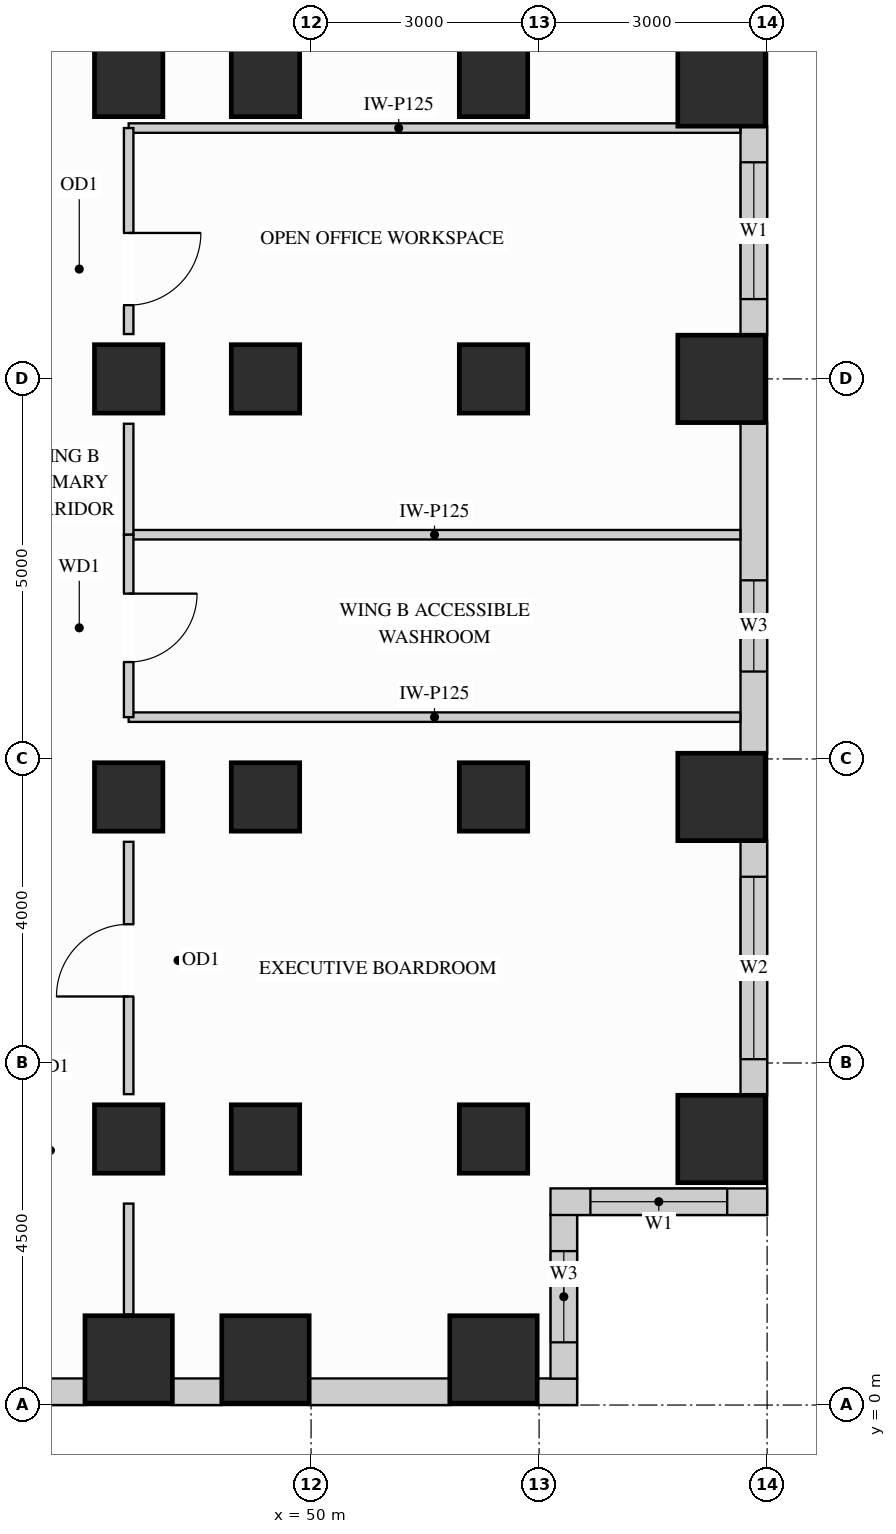
"""IFC4 building model, lengths in metres.
Left out: names, types, materials, properties, quantities, classifications, styles, units other than length and angle.
Written with IfcOpenShell. Run it as: python <this file> out.ifc"""

import sys

from ifc_helpers import new_model, si_unit, direction, frame, frame_2d, origin, origin_2d, place, context, subcontext, project, spatial, rectangle, extrude, source, transform, mapped, element, fill, save


model = new_model("IFC4")
c1 = context("Model", 3, precision=1e-05, world=origin(), true_north=direction((0.0, 1.0)))
c2 = subcontext(c1, "Body", "Model", "MODEL_VIEW")
j1 = project(units=[si_unit("LENGTHUNIT", "METRE"), si_unit("PLANEANGLEUNIT", "RADIAN")], contexts=[c1])
p1 = place(None, origin())
s1 = spatial("IfcSite", under=j1, at=p1, CompositionType="ELEMENT")
p2 = place(p1, origin())
s2 = spatial("IfcBuilding", under=s1, at=p2, CompositionType="ELEMENT")
p3 = place(p2, frame((0.0, 0.0, 131.4)))
s3 = spatial("IfcBuildingStorey", under=s2, at=p3, CompositionType="ELEMENT", Elevation=131.4)
m1 = source(origin(), c2, "Body", "SweptSolid", [
    extrude(rectangle(XDim=0.9, YDim=0.9, at=origin_2d()), origin(), (0.0, 0.0, 1.0), 3.38),
])
for number, where, z_axis, x_axis in (
    (1, (47.6, 13.5, 0.0), (0.0, 0.0, 1.0), (1.0, 0.0, 0.0)),
    (2, (47.6, 3.5, 0.0), (0.0, 0.0, 1.0), (1.0, 0.0, 0.0)),
    (3, (47.6, 8.0, 0.0), (0.0, 0.0, 1.0), (1.0, 0.0, 0.0)),
    (4, (47.6, 17.4, 0.0), (0.0, 0.0, 1.0), (1.0, 0.0, 0.0)),
    (5, (49.4, 13.5, 0.0), (0.0, 0.0, 1.0), (1.0, 0.0, 0.0)),
    (6, (49.4, 17.4, 0.0), (0.0, 0.0, 1.0), (1.0, 0.0, 0.0)),
    (7, (49.4, 3.5, 0.0), (0.0, 0.0, 1.0), (1.0, 0.0, 0.0)),
    (8, (49.4, 8.0, 0.0), (0.0, 0.0, 1.0), (1.0, 0.0, 0.0)),
    (9, (52.4, 13.5, 0.0), (0.0, 0.0, 1.0), (1.0, 0.0, 0.0)),
    (10, (52.4, 17.4, 0.0), (0.0, 0.0, 1.0), (1.0, 0.0, 0.0)),
    (11, (52.4, 3.5, 0.0), (0.0, 0.0, 1.0), (1.0, 0.0, 0.0)),
    (12, (52.4, 8.0, 0.0), (0.0, 0.0, 1.0), (1.0, 0.0, 0.0)),
):
    element("IfcColumn", number, at=place(p3, frame(where, z_axis=z_axis, x_axis=x_axis)), inside=s3, PredefinedType="COLUMN", context=c2, shape_type="MappedRepresentation", body=[
        mapped(m1, transform((0.0, 0.0, 0.0), x_axis=(1.0, 0.0, 0.0), y_axis=(0.0, 1.0, 0.0), z_axis=(0.0, 0.0, 1.0))),
    ])
m2 = source(origin(), c2, "Body", "SweptSolid", [
    extrude(rectangle(XDim=1.15, YDim=1.15, at=origin_2d()), origin(), (0.0, 0.0, 1.0), 3.38),
])
for number, where, z_axis, x_axis in (
    (13, (55.4, 13.5, 0.0), (0.0, 0.0, 1.0), (1.0, 0.0, 0.0)),
    (14, (55.4, 17.4, 0.0), (0.0, 0.0, 1.0), (1.0, 0.0, 0.0)),
    (15, (55.4, 3.5, 0.0), (0.0, 0.0, 1.0), (1.0, 0.0, 0.0)),
    (16, (55.4, 8.0, 0.0), (0.0, 0.0, 1.0), (1.0, 0.0, 0.0)),
    (17, (47.6, 0.6, 0.0), (0.0, 0.0, 1.0), (1.0, 0.0, 0.0)),
    (18, (49.4, 0.6, 0.0), (0.0, 0.0, 1.0), (1.0, 0.0, 0.0)),
    (19, (52.4, 0.6, 0.0), (0.0, 0.0, 1.0), (1.0, 0.0, 0.0)),
):
    element("IfcColumn", number, at=place(p3, frame(where, z_axis=z_axis, x_axis=x_axis)), inside=s3, PredefinedType="COLUMN", context=c2, shape_type="MappedRepresentation", body=[
        mapped(m2, transform((0.0, 0.0, 0.0), x_axis=(1.0, 0.0, 0.0), y_axis=(0.0, 1.0, 0.0), z_axis=(0.0, 0.0, 1.0))),
    ])
p4 = place(p3, frame((40.573, 0.175, 0.0), z_axis=(0.0, 0.0, 1.0), x_axis=(1.0, 0.0, 0.0)))
e20 = element("IfcWall", 20, at=p4, inside=s3, PredefinedType="SOLIDWALL", context=c2, shape_type="SweptSolid", body=[
    extrude(rectangle(XDim=6.454, YDim=0.35, at=frame_2d((3.227, 0.0))), origin(), (0.0, 0.0, 1.0), 2.428),
])
p5 = place(p4, frame((0.712, 0.0, 0.78)))
e21 = element("IfcOpeningElement", 21, at=p5, cuts=e20, PredefinedType="OPENING", context=c2, shape_type="SweptSolid", body=[
    extrude(rectangle(XDim=1.8, YDim=1.468, at=frame_2d((0.9, 0.734))), frame((0.0, 0.185, 0.0), z_axis=(0.0, -1.0, 0.0), x_axis=(1.0, 0.0, 0.0)), (0.0, 0.0, 1.0), 0.37),
])
p6 = place(p4, frame((2.905, 0.0, 0.78)))
e22 = element("IfcOpeningElement", 22, at=p6, cuts=e20, PredefinedType="OPENING", context=c2, shape_type="SweptSolid", body=[
    extrude(rectangle(XDim=1.8, YDim=1.468, at=frame_2d((0.9, 0.734))), frame((0.0, 0.185, 0.0), z_axis=(0.0, -1.0, 0.0), x_axis=(1.0, 0.0, 0.0)), (0.0, 0.0, 1.0), 0.37),
])
m3 = source(origin(), c2, "Body", "SweptSolid", [
    extrude(rectangle(XDim=0.654, YDim=0.35, at=frame_2d((0.327, 0.0))), origin(), (0.0, 0.0, 1.0), 3.365),
])
p7 = place(p3, frame((48.173, 0.175, 0.0), z_axis=(0.0, 0.0, 1.0), x_axis=(1.0, 0.0, 0.0)))
e23 = element("IfcWall", 23, at=p7, inside=s3, PredefinedType="SOLIDWALL", context=c2, shape_type="MappedRepresentation", body=[
    mapped(m3, transform((0.0, 0.0, 0.0), x_axis=(1.0, 0.0, 0.0), y_axis=(0.0, 1.0, 0.0), z_axis=(0.0, 0.0, 1.0))),
])
m4 = source(origin(), c2, "Body", "SweptSolid", [
    extrude(rectangle(XDim=1.854, YDim=0.35, at=frame_2d((0.927, 0.0))), origin(), (0.0, 0.0, 1.0), 3.365),
])
p8 = place(p3, frame((49.973, 0.175, 0.0), z_axis=(0.0, 0.0, 1.0), x_axis=(1.0, 0.0, 0.0)))
e24 = element("IfcWall", 24, at=p8, inside=s3, PredefinedType="SOLIDWALL", context=c2, shape_type="MappedRepresentation", body=[
    mapped(m4, transform((0.0, 0.0, 0.0), x_axis=(1.0, 0.0, 0.0), y_axis=(0.0, 1.0, 0.0), z_axis=(0.0, 0.0, 1.0))),
])
m5 = source(origin(), c2, "Body", "SweptSolid", [
    extrude(rectangle(XDim=0.527, YDim=0.35, at=frame_2d((0.264, 0.0))), origin(), (0.0, 0.0, 1.0), 3.365),
])
p9 = place(p3, frame((52.973, 0.175, 0.0), z_axis=(0.0, 0.0, 1.0), x_axis=(1.0, 0.0, 0.0)))
e25 = element("IfcWall", 25, at=p9, inside=s3, PredefinedType="SOLIDWALL", context=c2, shape_type="MappedRepresentation", body=[
    mapped(m5, transform((0.0, 0.0, 0.0), x_axis=(1.0, 0.0, 0.0), y_axis=(0.0, 1.0, 0.0), z_axis=(0.0, 0.0, 1.0))),
])
p10 = place(p3, frame((53.325, 0.348, 0.0), z_axis=(0.0, 0.0, 1.0), x_axis=(0.0, 1.0, 0.0)))
e26 = element("IfcWall", 26, at=p10, inside=s3, PredefinedType="SOLIDWALL", context=c2, shape_type="SweptSolid", body=[
    extrude(rectangle(XDim=2.154, YDim=0.35, at=frame_2d((1.077, 0.0))), origin(), (0.0, 0.0, 1.0), 3.365),
])
p11 = place(p10, frame((0.477, 0.0, 0.78)))
e27 = element("IfcOpeningElement", 27, at=p11, cuts=e26, PredefinedType="OPENING", context=c2, shape_type="SweptSolid", body=[
    extrude(rectangle(XDim=1.2, YDim=2.1, at=frame_2d((0.6, 1.05))), frame((0.0, 0.185, 0.0), z_axis=(0.0, -1.0, 0.0), x_axis=(1.0, 0.0, 0.0)), (0.0, 0.0, 1.0), 0.37),
])
p12 = place(p3, frame((53.15, 2.675, 0.0), z_axis=(0.0, 0.0, 1.0), x_axis=(1.0, 0.0, 0.0)))
e28 = element("IfcWall", 28, at=p12, inside=s3, PredefinedType="SOLIDWALL", context=c2, shape_type="SweptSolid", body=[
    extrude(rectangle(XDim=2.85, YDim=0.35, at=frame_2d((1.425, 0.0))), origin(), (0.0, 0.0, 1.0), 3.365),
])
p13 = place(p12, frame((0.525, 0.0, 0.78)))
e29 = element("IfcOpeningElement", 29, at=p13, cuts=e28, PredefinedType="OPENING", context=c2, shape_type="SweptSolid", body=[
    extrude(rectangle(XDim=1.8, YDim=2.1, at=frame_2d((0.9, 1.05))), frame((0.0, 0.185, 0.0), z_axis=(0.0, -1.0, 0.0), x_axis=(1.0, 0.0, 0.0)), (0.0, 0.0, 1.0), 0.37),
])
p14 = place(p3, frame((55.825, 4.073, 0.0), z_axis=(0.0, 0.0, 1.0), x_axis=(0.0, 1.0, 0.0)))
e30 = element("IfcWall", 30, at=p14, inside=s3, PredefinedType="SOLIDWALL", context=c2, shape_type="SweptSolid", body=[
    extrude(rectangle(XDim=3.354, YDim=0.35, at=frame_2d((1.677, 0.0))), origin(), (0.0, 0.0, 1.0), 3.365),
])
p15 = place(p14, frame((0.477, 0.0, 0.78)))
e31 = element("IfcOpeningElement", 31, at=p15, cuts=e30, PredefinedType="OPENING", context=c2, shape_type="SweptSolid", body=[
    extrude(rectangle(XDim=2.4, YDim=2.1, at=frame_2d((1.2, 1.05))), frame((0.0, 0.185, 0.0), z_axis=(0.0, -1.0, 0.0), x_axis=(1.0, 0.0, 0.0)), (0.0, 0.0, 1.0), 0.37),
])
p16 = place(p3, frame((55.825, 8.573, 0.0), z_axis=(0.0, 0.0, 1.0), x_axis=(0.0, 1.0, 0.0)))
e32 = element("IfcWall", 32, at=p16, inside=s3, PredefinedType="SOLIDWALL", context=c2, shape_type="SweptSolid", body=[
    extrude(rectangle(XDim=4.354, YDim=0.35, at=frame_2d((2.177, 0.0))), origin(), (0.0, 0.0, 1.0), 3.365),
])
p17 = place(p16, frame((1.077, 0.0, 0.78)))
e33 = element("IfcOpeningElement", 33, at=p17, cuts=e32, PredefinedType="OPENING", context=c2, shape_type="SweptSolid", body=[
    extrude(rectangle(XDim=1.2, YDim=2.1, at=frame_2d((0.6, 1.05))), frame((0.0, 0.185, 0.0), z_axis=(0.0, -1.0, 0.0), x_axis=(1.0, 0.0, 0.0)), (0.0, 0.0, 1.0), 0.37),
])
p18 = place(p3, frame((55.825, 14.073, 0.0), z_axis=(0.0, 0.0, 1.0), x_axis=(0.0, 1.0, 0.0)))
e34 = element("IfcWall", 34, at=p18, inside=s3, PredefinedType="SOLIDWALL", context=c2, shape_type="SweptSolid", body=[
    extrude(rectangle(XDim=2.754, YDim=0.35, at=frame_2d((1.377, 0.0))), origin(), (0.0, 0.0, 1.0), 3.365),
])
p19 = place(p18, frame((0.477, 0.0, 0.78)))
e35 = element("IfcOpeningElement", 35, at=p19, cuts=e34, PredefinedType="OPENING", context=c2, shape_type="SweptSolid", body=[
    extrude(rectangle(XDim=1.8, YDim=2.1, at=frame_2d((0.9, 1.05))), frame((0.0, 0.185, 0.0), z_axis=(0.0, -1.0, 0.0), x_axis=(1.0, 0.0, 0.0)), (0.0, 0.0, 1.0), 0.37),
])
m6 = source(origin(), c2, "Body", "SweptSolid", [
    extrude(rectangle(XDim=8.048, YDim=0.125, at=frame_2d((4.024, 0.0))), origin(), (0.0, 0.0, 1.0), 3.365),
])
for number, where, z_axis, x_axis in (
    (36, (47.6, 11.45, 0.0), (0.0, 0.0, 1.0), (1.0, 0.0, 0.0)),
    (37, (47.6, 16.8, 0.0), (0.0, 0.0, 1.0), (1.0, 0.0, 0.0)),
    (38, (47.6, 9.05, 0.0), (0.0, 0.0, 1.0), (1.0, 0.0, 0.0)),
):
    element("IfcWall", number, at=place(p3, frame(where, z_axis=z_axis, x_axis=x_axis)), inside=s3, PredefinedType="PARTITIONING", context=c2, shape_type="MappedRepresentation", body=[
        mapped(m6, transform((0.0, 0.0, 0.0), x_axis=(1.0, 0.0, 0.0), y_axis=(0.0, 1.0, 0.0), z_axis=(0.0, 0.0, 1.0))),
    ])
p20 = place(p3, frame((47.6, 4.09, 0.0), z_axis=(0.0, 0.0, 1.0), x_axis=(0.0, 1.0, 0.0)))
e39 = element("IfcWall", 39, at=p20, inside=s3, PredefinedType="PARTITIONING", context=c2, shape_type="SweptSolid", body=[
    extrude(rectangle(XDim=3.32, YDim=0.125, at=frame_2d((1.66, 0.0))), origin(), (0.0, 0.0, 1.0), 2.677),
])
p21 = place(p20, frame((1.285, 0.0, 0.0)))
e40 = element("IfcOpeningElement", 40, at=p21, cuts=e39, PredefinedType="OPENING", context=c2, shape_type="SweptSolid", body=[
    extrude(rectangle(XDim=0.95, YDim=2.15, at=frame_2d((0.475, 1.075))), frame((0.0, 0.073, 0.0), z_axis=(0.0, -1.0, 0.0), x_axis=(1.0, 0.0, 0.0)), (0.0, 0.0, 1.0), 0.145),
])
m7 = source(origin(), c2, "Body", "SweptSolid", [
    extrude(rectangle(XDim=1.46, YDim=0.125, at=frame_2d((0.73, 0.0))), origin(), (0.0, 0.0, 1.0), 2.677),
])
for number, where, z_axis, x_axis in (
    (41, (47.6, 1.19, 0.0), (0.0, 0.0, 1.0), (0.0, 1.0, 0.0)),
    (42, (47.6, 11.45, 0.0), (0.0, 0.0, 1.0), (0.0, 1.0, 0.0)),
):
    element("IfcWall", number, at=place(p3, frame(where, z_axis=z_axis, x_axis=x_axis)), inside=s3, PredefinedType="PARTITIONING", context=c2, shape_type="MappedRepresentation", body=[
        mapped(m7, transform((0.0, 0.0, 0.0), x_axis=(1.0, 0.0, 0.0), y_axis=(0.0, 1.0, 0.0), z_axis=(0.0, 0.0, 1.0))),
    ])
p22 = place(p3, frame((47.6, 14.09, 0.0), z_axis=(0.0, 0.0, 1.0), x_axis=(0.0, 1.0, 0.0)))
e43 = element("IfcWall", 43, at=p22, inside=s3, PredefinedType="PARTITIONING", context=c2, shape_type="SweptSolid", body=[
    extrude(rectangle(XDim=2.71, YDim=0.125, at=frame_2d((1.355, 0.0))), origin(), (0.0, 0.0, 1.0), 2.677),
])
p23 = place(p22, frame((0.38, 0.0, 0.0)))
e44 = element("IfcOpeningElement", 44, at=p23, cuts=e43, PredefinedType="OPENING", context=c2, shape_type="SweptSolid", body=[
    extrude(rectangle(XDim=0.95, YDim=2.15, at=frame_2d((0.475, 1.075))), frame((0.0, 0.073, 0.0), z_axis=(0.0, -1.0, 0.0), x_axis=(1.0, 0.0, 0.0)), (0.0, 0.0, 1.0), 0.145),
])
p24 = place(p3, frame((47.6, 9.05, 0.0), z_axis=(0.0, 0.0, 1.0), x_axis=(0.0, 1.0, 0.0)))
e45 = element("IfcWall", 45, at=p24, inside=s3, PredefinedType="PARTITIONING", context=c2, shape_type="SweptSolid", body=[
    extrude(rectangle(XDim=2.4, YDim=0.125, at=frame_2d((1.2, 0.0))), origin(), (0.0, 0.0, 1.0), 2.677),
])
p25 = place(p24, frame((0.725, 0.0, 0.0)))
e46 = element("IfcOpeningElement", 46, at=p25, cuts=e45, PredefinedType="OPENING", context=c2, shape_type="SweptSolid", body=[
    extrude(rectangle(XDim=0.9, YDim=2.15, at=frame_2d((0.45, 1.075))), frame((0.0, 0.073, 0.0), z_axis=(0.0, -1.0, 0.0), x_axis=(1.0, 0.0, 0.0)), (0.0, 0.0, 1.0), 0.145),
])
m8 = source(origin(), c2, "Body", "SweptSolid", [
    extrude(rectangle(XDim=0.95, YDim=2.15, at=frame_2d((0.475, 1.075))), frame((0.0, 0.025, 0.0), z_axis=(0.0, -1.0, 0.0), x_axis=(1.0, 0.0, 0.0)), (0.0, 0.0, 1.0), 0.05),
])
p26 = place(p21, origin())
e47 = element("IfcDoor", 47, at=p26, inside=s3, OperationType="SINGLE_SWING_LEFT", PredefinedType="DOOR", context=c2, shape_type="MappedRepresentation", body=[
    mapped(m8, transform((0.0, 0.0, 0.0), x_axis=(1.0, 0.0, 0.0), y_axis=(0.0, 1.0, 0.0), z_axis=(0.0, 0.0, 1.0))),
])
fill(e40, e47)
p27 = place(p23, origin())
e48 = element("IfcDoor", 48, at=p27, inside=s3, OperationType="SINGLE_SWING_RIGHT", PredefinedType="DOOR", context=c2, shape_type="MappedRepresentation", body=[
    mapped(m8, transform((0.0, 0.0, 0.0), x_axis=(1.0, 0.0, 0.0), y_axis=(0.0, 1.0, 0.0), z_axis=(0.0, 0.0, 1.0))),
])
fill(e44, e48)
m9 = source(origin(), c2, "Body", "SweptSolid", [
    extrude(rectangle(XDim=0.9, YDim=2.15, at=frame_2d((0.45, 1.075))), frame((0.0, 0.025, 0.0), z_axis=(0.0, -1.0, 0.0), x_axis=(1.0, 0.0, 0.0)), (0.0, 0.0, 1.0), 0.05),
])
p28 = place(p25, origin())
e49 = element("IfcDoor", 49, at=p28, inside=s3, OperationType="SINGLE_SWING_RIGHT", PredefinedType="DOOR", context=c2, shape_type="MappedRepresentation", body=[
    mapped(m9, transform((0.0, 0.0, 0.0), x_axis=(1.0, 0.0, 0.0), y_axis=(0.0, 1.0, 0.0), z_axis=(0.0, 0.0, 1.0))),
])
fill(e46, e49)
m10 = source(origin(), c2, "Body", "SweptSolid", [
    extrude(rectangle(XDim=1.8, YDim=2.1, at=frame_2d((0.9, 1.05))), frame((0.0, 0.03, 0.0), z_axis=(0.0, -1.0, 0.0), x_axis=(1.0, 0.0, 0.0)), (0.0, 0.0, 1.0), 0.06),
])
p29 = place(p13, origin())
e50 = element("IfcWindow", 50, at=p29, inside=s3, PartitioningType="SINGLE_PANEL", PredefinedType="WINDOW", context=c2, shape_type="MappedRepresentation", body=[
    mapped(m10, transform((0.0, 0.0, 0.0), x_axis=(1.0, 0.0, 0.0), y_axis=(0.0, 1.0, 0.0), z_axis=(0.0, 0.0, 1.0))),
])
fill(e29, e50)
p30 = place(p19, origin())
e51 = element("IfcWindow", 51, at=p30, inside=s3, PartitioningType="SINGLE_PANEL", PredefinedType="WINDOW", context=c2, shape_type="MappedRepresentation", body=[
    mapped(m10, transform((0.0, 0.0, 0.0), x_axis=(1.0, 0.0, 0.0), y_axis=(0.0, 1.0, 0.0), z_axis=(0.0, 0.0, 1.0))),
])
fill(e35, e51)
m11 = source(origin(), c2, "Body", "SweptSolid", [
    extrude(rectangle(XDim=2.4, YDim=2.1, at=frame_2d((1.2, 1.05))), frame((0.0, 0.03, 0.0), z_axis=(0.0, -1.0, 0.0), x_axis=(1.0, 0.0, 0.0)), (0.0, 0.0, 1.0), 0.06),
])
p31 = place(p15, origin())
e52 = element("IfcWindow", 52, at=p31, inside=s3, PartitioningType="SINGLE_PANEL", PredefinedType="WINDOW", context=c2, shape_type="MappedRepresentation", body=[
    mapped(m11, transform((0.0, 0.0, 0.0), x_axis=(1.0, 0.0, 0.0), y_axis=(0.0, 1.0, 0.0), z_axis=(0.0, 0.0, 1.0))),
])
fill(e31, e52)
m12 = source(origin(), c2, "Body", "SweptSolid", [
    extrude(rectangle(XDim=1.2, YDim=2.1, at=frame_2d((0.6, 1.05))), frame((0.0, 0.03, 0.0), z_axis=(0.0, -1.0, 0.0), x_axis=(1.0, 0.0, 0.0)), (0.0, 0.0, 1.0), 0.06),
])
p32 = place(p11, origin())
e53 = element("IfcWindow", 53, at=p32, inside=s3, PartitioningType="SINGLE_PANEL", PredefinedType="WINDOW", context=c2, shape_type="MappedRepresentation", body=[
    mapped(m12, transform((0.0, 0.0, 0.0), x_axis=(1.0, 0.0, 0.0), y_axis=(0.0, 1.0, 0.0), z_axis=(0.0, 0.0, 1.0))),
])
fill(e27, e53)
p33 = place(p17, origin())
e54 = element("IfcWindow", 54, at=p33, inside=s3, PartitioningType="SINGLE_PANEL", PredefinedType="WINDOW", context=c2, shape_type="MappedRepresentation", body=[
    mapped(m12, transform((0.0, 0.0, 0.0), x_axis=(1.0, 0.0, 0.0), y_axis=(0.0, 1.0, 0.0), z_axis=(0.0, 0.0, 1.0))),
])
fill(e33, e54)
save(model, sys.argv[1])
